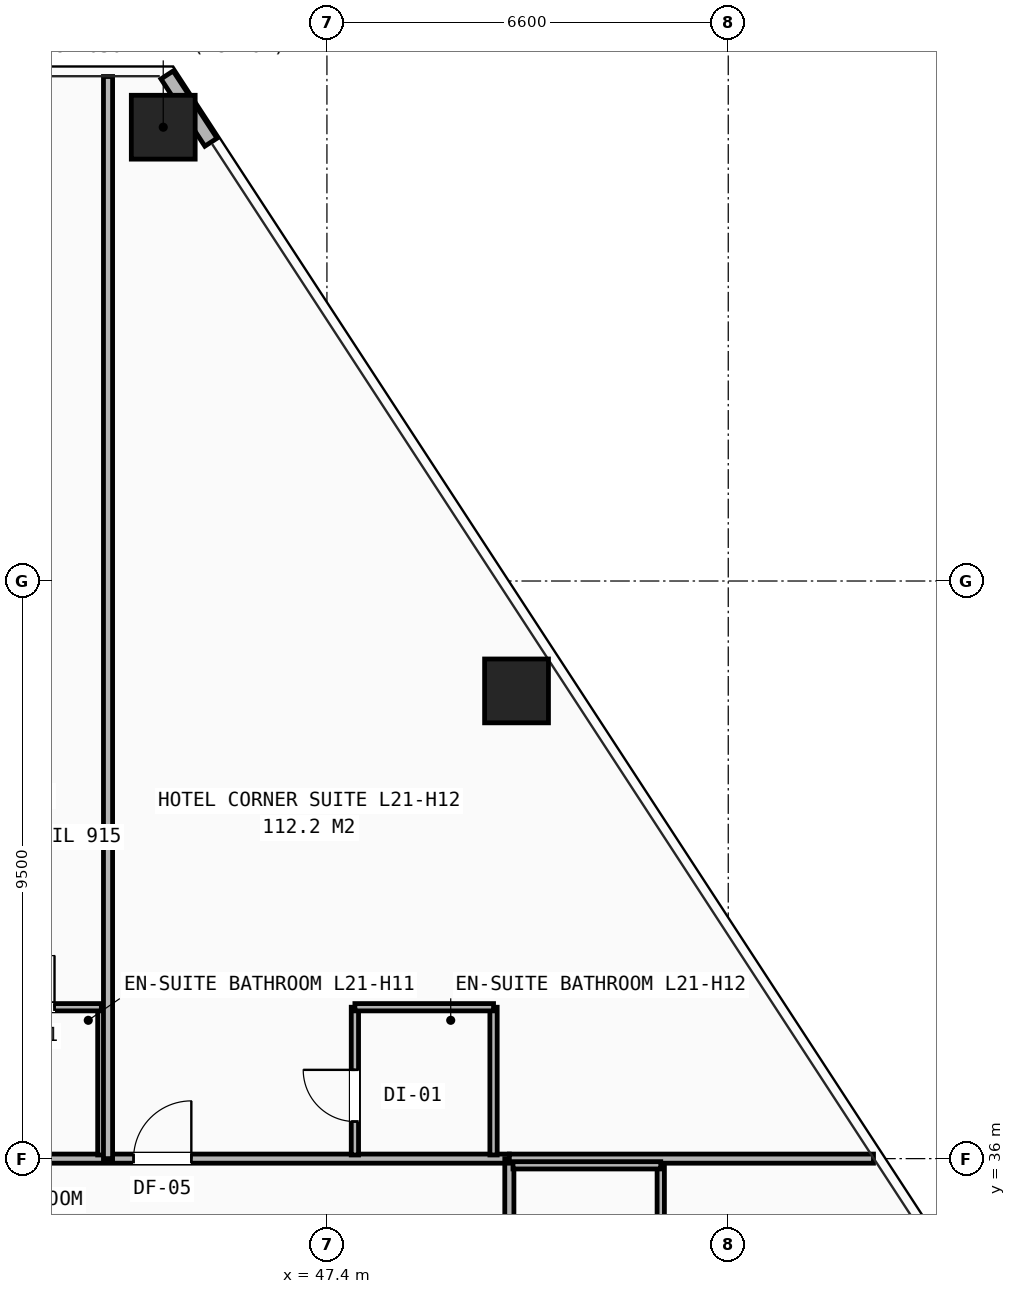
"""IFC4 building model, lengths in metres.
Left out: names, types, materials, properties, quantities, classifications, styles, units other than length and angle.
Written with IfcOpenShell. Run it as: python <this file> out.ifc"""

import sys

from ifc_helpers import new_model, si_unit, direction, frame, frame_2d, origin, origin_2d, place, context, subcontext, project, spatial, rectangle, hollow_rectangle, extrude, element, fill, save


model = new_model("IFC4")
c1 = context("Model", 3, precision=1e-05, world=origin(), true_north=direction((0.0, 1.0)))
c2 = subcontext(c1, "Body", "Model", "MODEL_VIEW")
j1 = project(units=[si_unit("LENGTHUNIT", "METRE"), si_unit("PLANEANGLEUNIT", "RADIAN")], contexts=[c1])
p1 = place(None, origin())
s1 = spatial("IfcSite", under=j1, at=p1, CompositionType="ELEMENT")
p2 = place(p1, origin())
s2 = spatial("IfcBuilding", under=s1, at=p2, CompositionType="ELEMENT")
p3 = place(p2, frame((0.0, 0.0, 76.6)))
s3 = spatial("IfcBuildingStorey", under=s2, at=p3, CompositionType="ELEMENT", Elevation=76.6)
for number, where, z_axis, x_axis in (
    (1, (44.708, 52.964, 0.0), (0.0, 0.0, 1.0), (1.0, 0.0, 0.0)),
    (2, (50.518, 43.692, 0.0), (0.0, 0.0, 1.0), (1.0, 0.0, 0.0)),
):
    element("IfcColumn", number, at=place(p3, frame(where, z_axis=z_axis, x_axis=x_axis)), inside=s3, PredefinedType="COLUMN", context=c2, shape_type="SweptSolid", body=[
        extrude(hollow_rectangle(XDim=1.05, YDim=1.05, WallThickness=0.07, at=origin_2d()), origin(), (0.0, 0.0, 1.0), 3.2),
    ])
p4 = place(p3, frame((45.493, 52.717, 0.0), z_axis=(0.0, 0.0, 1.0), x_axis=(-0.546222655951, 0.83764002419, 0.0)))
e3 = element("IfcWall", 3, at=p4, inside=s3, PredefinedType="SHEAR", context=c2, shape_type="SweptSolid", body=[
    extrude(rectangle(XDim=1.32, YDim=0.24, at=frame_2d((0.66, 0.0))), origin(), (0.0, 0.0, 1.0), 2.253),
])
p5 = place(p3, frame((40.75, 36.0, 0.0), z_axis=(0.0, 0.0, 1.0), x_axis=(1.0, 0.0, 0.0)))
e4 = element("IfcWall", 4, at=p5, inside=s3, PredefinedType="PARTITIONING", context=c2, shape_type="SweptSolid", body=[
    extrude(rectangle(XDim=9.65, YDim=0.15, at=frame_2d((4.825, 0.0))), origin(), (0.0, 0.0, 1.0), 2.503),
])
p6 = place(p5, frame((3.47, 0.0, 0.0)))
e5 = element("IfcOpeningElement", 5, at=p6, cuts=e4, PredefinedType="OPENING", context=c2, shape_type="SweptSolid", body=[
    extrude(rectangle(XDim=0.95, YDim=2.1, at=frame_2d((0.475, 1.05))), frame((0.0, 0.085, 0.0), z_axis=(0.0, -1.0, 0.0), x_axis=(1.0, 0.0, 0.0)), (0.0, 0.0, 1.0), 0.17),
])
p7 = place(p3, frame((50.4, 14.1, 0.0), z_axis=(0.0, 0.0, 1.0), x_axis=(0.0, 1.0, 0.0)))
e6 = element("IfcWall", 6, at=p7, inside=s3, PredefinedType="PARTITIONING", context=c2, shape_type="SweptSolid", body=[
    extrude(rectangle(XDim=21.9, YDim=0.15, at=frame_2d((10.95, 0.0))), origin(), (0.0, 0.0, 1.0), 2.421),
])
p8 = place(p7, frame((0.42, 0.0, 0.0)))
e7 = element("IfcOpeningElement", 7, at=p8, cuts=e6, PredefinedType="OPENING", context=c2, shape_type="SweptSolid", body=[
    extrude(rectangle(XDim=0.95, YDim=2.1, at=frame_2d((0.475, 1.05))), frame((0.0, 0.085, 0.0), z_axis=(0.0, -1.0, 0.0), x_axis=(1.0, 0.0, 0.0)), (0.0, 0.0, 1.0), 0.17),
])
p9 = place(p7, frame((11.82, 0.0, 0.0)))
e8 = element("IfcOpeningElement", 8, at=p9, cuts=e6, PredefinedType="OPENING", context=c2, shape_type="SweptSolid", body=[
    extrude(rectangle(XDim=0.95, YDim=2.1, at=frame_2d((0.475, 1.05))), frame((0.0, 0.085, 0.0), z_axis=(0.0, -1.0, 0.0), x_axis=(1.0, 0.0, 0.0)), (0.0, 0.0, 1.0), 0.17),
])
p10 = place(p3, frame((50.4, 36.0, 0.0), z_axis=(0.0, 0.0, 1.0), x_axis=(1.0, 0.0, 0.0)))
e9 = element("IfcWall", 9, at=p10, inside=s3, PredefinedType="PARTITIONING", context=c2, shape_type="SweptSolid", body=[
    extrude(rectangle(XDim=5.989, YDim=0.15, at=frame_2d((2.994, 0.0))), origin(), (0.0, 0.0, 1.0), 2.258),
])
p11 = place(p3, frame((52.89, 33.61, 0.0), z_axis=(0.0, 0.0, 1.0), x_axis=(0.0, 1.0, 0.0)))
e10 = element("IfcWall", 10, at=p11, inside=s3, PredefinedType="PARTITIONING", context=c2, shape_type="SweptSolid", body=[
    extrude(rectangle(XDim=2.28, YDim=0.12, at=frame_2d((1.14, 0.0))), origin(), (0.0, 0.0, 1.0), 2.97),
])
for number, where, z_axis, x_axis in (
    (11, (50.46, 35.89, 0.0), (0.0, 0.0, 1.0), (1.0, 0.0, 0.0)),
    (12, (43.69, 36.06, 0.0), (0.0, 0.0, 1.0), (0.0, 1.0, 0.0)),
):
    element("IfcWall", number, at=place(p3, frame(where, z_axis=z_axis, x_axis=x_axis)), inside=s3, PredefinedType="PARTITIONING", context=c2, shape_type="SweptSolid", body=[
        extrude(rectangle(XDim=2.43, YDim=0.12, at=frame_2d((1.215, 0.0))), origin(), (0.0, 0.0, 1.0), 2.97),
    ])
p12 = place(p3, frame((41.95, 38.49, 0.0), z_axis=(0.0, 0.0, 1.0), x_axis=(1.0, 0.0, 0.0)))
e13 = element("IfcWall", 13, at=p12, inside=s3, PredefinedType="PARTITIONING", context=c2, shape_type="SweptSolid", body=[
    extrude(rectangle(XDim=1.74, YDim=0.12, at=frame_2d((0.87, 0.0))), origin(), (0.0, 0.0, 1.0), 2.97),
])
p13 = place(p12, frame((0.12, 0.0, 0.0)))
e14 = element("IfcOpeningElement", 14, at=p13, cuts=e13, PredefinedType="OPENING", context=c2, shape_type="SweptSolid", body=[
    extrude(rectangle(XDim=0.85, YDim=2.05, at=frame_2d((0.425, 1.025))), frame((0.0, 0.07, 0.0), z_axis=(0.0, -1.0, 0.0), x_axis=(1.0, 0.0, 0.0)), (0.0, 0.0, 1.0), 0.14),
])
p14 = place(p3, frame((43.8, 36.0, 0.0), z_axis=(0.0, 0.0, 1.0), x_axis=(0.0, 1.0, 0.0)))
e15 = element("IfcWall", 15, at=p14, inside=s3, PredefinedType="PARTITIONING", context=c2, shape_type="SweptSolid", body=[
    extrude(rectangle(XDim=17.797, YDim=0.15, at=frame_2d((8.899, 0.0))), origin(), (0.0, 0.0, 1.0), 2.258),
])
p15 = place(p3, frame((47.86, 36.06, 0.0), z_axis=(0.0, 0.0, 1.0), x_axis=(0.0, 1.0, 0.0)))
e16 = element("IfcWall", 16, at=p15, inside=s3, PredefinedType="PARTITIONING", context=c2, shape_type="SweptSolid", body=[
    extrude(rectangle(XDim=2.43, YDim=0.12, at=frame_2d((1.215, 0.0))), origin(), (0.0, 0.0, 1.0), 2.503),
])
p16 = place(p15, frame((0.55, 0.0, 0.0)))
e17 = element("IfcOpeningElement", 17, at=p16, cuts=e16, PredefinedType="OPENING", context=c2, shape_type="SweptSolid", body=[
    extrude(rectangle(XDim=0.85, YDim=2.05, at=frame_2d((0.425, 1.025))), frame((0.0, 0.07, 0.0), z_axis=(0.0, -1.0, 0.0), x_axis=(1.0, 0.0, 0.0)), (0.0, 0.0, 1.0), 0.14),
])
p17 = place(p3, frame((50.14, 36.06, 0.0), z_axis=(0.0, 0.0, 1.0), x_axis=(0.0, 1.0, 0.0)))
e18 = element("IfcWall", 18, at=p17, inside=s3, PredefinedType="PARTITIONING", context=c2, shape_type="SweptSolid", body=[
    extrude(rectangle(XDim=2.43, YDim=0.12, at=frame_2d((1.215, 0.0))), origin(), (0.0, 0.0, 1.0), 2.503),
])
p18 = place(p3, frame((47.86, 38.49, 0.0), z_axis=(0.0, 0.0, 1.0), x_axis=(1.0, 0.0, 0.0)))
e19 = element("IfcWall", 19, at=p18, inside=s3, PredefinedType="PARTITIONING", context=c2, shape_type="SweptSolid", body=[
    extrude(rectangle(XDim=2.28, YDim=0.12, at=frame_2d((1.14, 0.0))), origin(), (0.0, 0.0, 1.0), 2.503),
])
p19 = place(p13, origin())
e20 = element("IfcDoor", 20, at=p19, inside=s3, OperationType="SINGLE_SWING_RIGHT", PredefinedType="DOOR", context=c2, shape_type="SweptSolid", body=[
    extrude(rectangle(XDim=0.85, YDim=2.05, at=frame_2d((0.425, 1.025))), frame((0.0, 0.025, 0.0), z_axis=(0.0, -1.0, 0.0), x_axis=(1.0, 0.0, 0.0)), (0.0, 0.0, 1.0), 0.05),
])
fill(e14, e20)
p20 = place(p6, origin())
e21 = element("IfcDoor", 21, at=p20, inside=s3, OperationType="SINGLE_SWING_RIGHT", PredefinedType="DOOR", context=c2, shape_type="SweptSolid", body=[
    extrude(rectangle(XDim=0.95, YDim=2.1, at=frame_2d((0.475, 1.05))), frame((0.0, 0.025, 0.0), z_axis=(0.0, -1.0, 0.0), x_axis=(1.0, 0.0, 0.0)), (0.0, 0.0, 1.0), 0.05),
])
fill(e5, e21)
p21 = place(p16, origin())
e22 = element("IfcDoor", 22, at=p21, inside=s3, OperationType="SINGLE_SWING_RIGHT", PredefinedType="DOOR", context=c2, shape_type="SweptSolid", body=[
    extrude(rectangle(XDim=0.85, YDim=2.05, at=frame_2d((0.425, 1.025))), frame((0.0, 0.025, 0.0), z_axis=(0.0, -1.0, 0.0), x_axis=(1.0, 0.0, 0.0)), (0.0, 0.0, 1.0), 0.05),
])
fill(e17, e22)
save(model, sys.argv[1])
